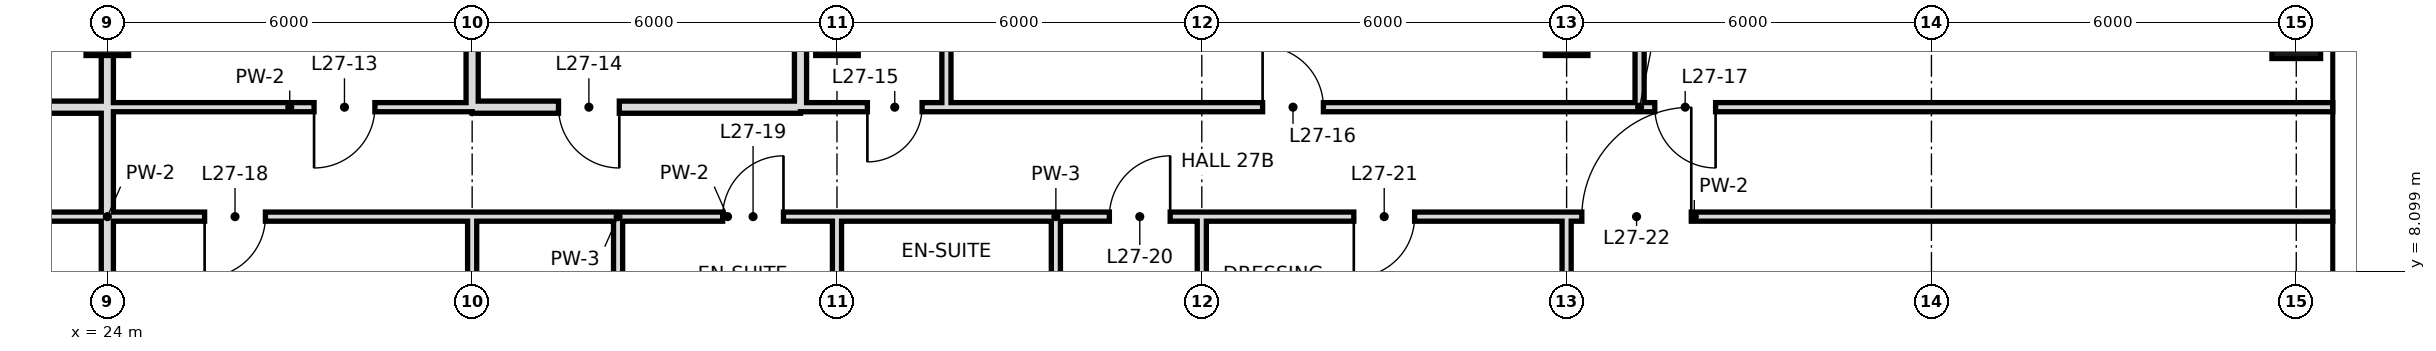
"""IFC4 building model, lengths in metres.
Left out: names, types, materials, properties, quantities, classifications, styles, units other than length and angle.
Written with IfcOpenShell. Run it as: python <this file> out.ifc"""

import sys

from ifc_helpers import new_model, si_unit, direction, frame, frame_2d, origin, origin_2d, place, context, subcontext, project, spatial, rectangle, hollow_rectangle, extrude, element, fill, save


model = new_model("IFC4")
c1 = context("Model", 3, precision=1e-05, world=origin(), true_north=direction((0.0, 1.0)))
c2 = subcontext(c1, "Body", "Model", "MODEL_VIEW")
j1 = project(units=[si_unit("LENGTHUNIT", "METRE"), si_unit("PLANEANGLEUNIT", "RADIAN")], contexts=[c1])
p1 = place(None, origin())
s1 = spatial("IfcSite", under=j1, at=p1, CompositionType="ELEMENT")
p2 = place(p1, origin())
s2 = spatial("IfcBuilding", under=s1, at=p2, CompositionType="ELEMENT")
p3 = place(p2, frame((0.0, 0.0, 123.2)))
s3 = spatial("IfcBuildingStorey", under=s2, at=p3, CompositionType="ELEMENT", Elevation=123.2)
for number, where, z_axis, x_axis in (
    (1, (24.0, 12.0, 0.0), (0.0, 0.0, 1.0), (1.0, 0.0, 0.0)),
    (2, (36.0, 12.0, 0.0), (0.0, 0.0, 1.0), (1.0, 0.0, 0.0)),
    (3, (48.0, 12.0, 0.0), (0.0, 0.0, 1.0), (1.0, 0.0, 0.0)),
):
    element("IfcColumn", number, at=place(p3, frame(where, z_axis=z_axis, x_axis=x_axis)), inside=s3, PredefinedType="COLUMN", context=c2, shape_type="SweptSolid", body=[
        extrude(hollow_rectangle(XDim=0.7, YDim=0.7, WallThickness=0.036, at=origin_2d()), origin(), (0.0, 0.0, 1.0), 3.6),
    ])
p4 = place(p3, frame((60.0, 12.0, 0.0), z_axis=(0.0, 0.0, 1.0), x_axis=(1.0, 0.0, 0.0)))
e4 = element("IfcColumn", 4, at=p4, inside=s3, PredefinedType="COLUMN", context=c2, shape_type="SweptSolid", body=[
    extrude(hollow_rectangle(XDim=0.8, YDim=0.8, WallThickness=0.04, at=origin_2d()), origin(), (0.0, 0.0, 1.0), 3.6),
])
p5 = place(p3, frame((24.0, 10.8, 0.0), z_axis=(0.0, 0.0, 1.0), x_axis=(0.0, 1.0, 0.0)))
e5 = element("IfcWall", 5, at=p5, inside=s3, PredefinedType="SOLIDWALL", context=c2, shape_type="SweptSolid", body=[
    extrude(rectangle(XDim=7.9, YDim=0.2, at=frame_2d((3.95, 0.0))), origin(), (0.0, 0.0, 1.0), 2.72),
])
p6 = place(p3, frame((24.0, 0.0, 0.0), z_axis=(0.0, 0.0, 1.0), x_axis=(0.0, 1.0, 0.0)))
e6 = element("IfcWall", 6, at=p6, inside=s3, PredefinedType="SOLIDWALL", context=c2, shape_type="SweptSolid", body=[
    extrude(rectangle(XDim=10.8, YDim=0.2, at=frame_2d((5.4, 0.0))), origin(), (0.0, 0.0, 1.0), 2.72),
])
p7 = place(p3, frame((30.0, 10.8, 0.0), z_axis=(0.0, 0.0, 1.0), x_axis=(0.0, 1.0, 0.0)))
e7 = element("IfcWall", 7, at=p7, inside=s3, PredefinedType="SOLIDWALL", context=c2, shape_type="SweptSolid", body=[
    extrude(rectangle(XDim=7.9, YDim=0.2, at=frame_2d((3.95, 0.0))), origin(), (0.0, 0.0, 1.0), 2.72),
])
p8 = place(p3, frame((30.0, 6.0, 0.0), z_axis=(0.0, 0.0, 1.0), x_axis=(0.0, 1.0, 0.0)))
e8 = element("IfcWall", 8, at=p8, inside=s3, PredefinedType="PARTITIONING", context=c2, shape_type="SweptSolid", body=[
    extrude(rectangle(XDim=3.0, YDim=0.15, at=frame_2d((1.5, 0.0))), origin(), (0.0, 0.0, 1.0), 2.72),
])
p9 = place(p3, frame((32.4, 6.0, 0.0), z_axis=(0.0, 0.0, 1.0), x_axis=(0.0, 1.0, 0.0)))
e9 = element("IfcWall", 9, at=p9, inside=s3, PredefinedType="PARTITIONING", context=c2, shape_type="SweptSolid", body=[
    extrude(rectangle(XDim=3.0, YDim=0.15, at=frame_2d((1.5, 0.0))), origin(), (0.0, 0.0, 1.0), 3.42),
])
p10 = place(p3, frame((35.4, 10.8, 0.0), z_axis=(0.0, 0.0, 1.0), x_axis=(0.0, 1.0, 0.0)))
e10 = element("IfcWall", 10, at=p10, inside=s3, PredefinedType="SOLIDWALL", context=c2, shape_type="SweptSolid", body=[
    extrude(rectangle(XDim=7.9, YDim=0.2, at=frame_2d((3.95, 0.0))), origin(), (0.0, 0.0, 1.0), 2.72),
])
p11 = place(p3, frame((36.0, 6.0, 0.0), z_axis=(0.0, 0.0, 1.0), x_axis=(0.0, 1.0, 0.0)))
e11 = element("IfcWall", 11, at=p11, inside=s3, PredefinedType="PARTITIONING", context=c2, shape_type="SweptSolid", body=[
    extrude(rectangle(XDim=3.0, YDim=0.15, at=frame_2d((1.5, 0.0))), origin(), (0.0, 0.0, 1.0), 2.72),
])
p12 = place(p3, frame((37.8, 10.8, 0.0), z_axis=(0.0, 0.0, 1.0), x_axis=(0.0, 1.0, 0.0)))
e12 = element("IfcWall", 12, at=p12, inside=s3, PredefinedType="PARTITIONING", context=c2, shape_type="SweptSolid", body=[
    extrude(rectangle(XDim=7.9, YDim=0.15, at=frame_2d((3.95, 0.0))), origin(), (0.0, 0.0, 1.0), 3.42),
])
p13 = place(p3, frame((39.6, 6.0, 0.0), z_axis=(0.0, 0.0, 1.0), x_axis=(0.0, 1.0, 0.0)))
e13 = element("IfcWall", 13, at=p13, inside=s3, PredefinedType="PARTITIONING", context=c2, shape_type="SweptSolid", body=[
    extrude(rectangle(XDim=3.0, YDim=0.15, at=frame_2d((1.5, 0.0))), origin(), (0.0, 0.0, 1.0), 3.42),
])
p14 = place(p3, frame((42.0, -0.6, 0.0), z_axis=(0.0, 0.0, 1.0), x_axis=(0.0, 1.0, 0.0)))
e14 = element("IfcWall", 14, at=p14, inside=s3, PredefinedType="PARTITIONING", context=c2, shape_type="SweptSolid", body=[
    extrude(rectangle(XDim=9.6, YDim=0.15, at=frame_2d((4.8, 0.0))), origin(), (0.0, 0.0, 1.0), 2.72),
])
p15 = place(p3, frame((48.0, 0.0, 0.0), z_axis=(0.0, 0.0, 1.0), x_axis=(0.0, 1.0, 0.0)))
e15 = element("IfcWall", 15, at=p15, inside=s3, PredefinedType="PARTITIONING", context=c2, shape_type="SweptSolid", body=[
    extrude(rectangle(XDim=9.0, YDim=0.15, at=frame_2d((4.5, 0.0))), origin(), (0.0, 0.0, 1.0), 2.72),
])
p16 = place(p3, frame((49.2, 10.8, 0.0), z_axis=(0.0, 0.0, 1.0), x_axis=(0.0, 1.0, 0.0)))
e16 = element("IfcWall", 16, at=p16, inside=s3, PredefinedType="PARTITIONING", context=c2, shape_type="SweptSolid", body=[
    extrude(rectangle(XDim=20.4, YDim=0.15, at=frame_2d((10.2, 0.0))), origin(), (0.0, 0.0, 1.0), 3.42),
])
p17 = place(p16, frame((17.68, 0.0, 0.0)))
e17 = element("IfcOpeningElement", 17, at=p17, cuts=e16, PredefinedType="OPENING", context=c2, shape_type="SweptSolid", body=[
    extrude(rectangle(XDim=1.0, YDim=2.4, at=frame_2d((0.5, 1.2))), frame((0.0, 0.085, 0.0), z_axis=(0.0, -1.0, 0.0), x_axis=(1.0, 0.0, 0.0)), (0.0, 0.0, 1.0), 0.17),
])
p18 = place(p16, frame((9.88, 0.0, 0.0)))
e18 = element("IfcOpeningElement", 18, at=p18, cuts=e16, PredefinedType="OPENING", context=c2, shape_type="SweptSolid", body=[
    extrude(rectangle(XDim=1.0, YDim=2.4, at=frame_2d((0.5, 1.2))), frame((0.0, 0.085, 0.0), z_axis=(0.0, -1.0, 0.0), x_axis=(1.0, 0.0, 0.0)), (0.0, 0.0, 1.0), 0.17),
])
p19 = place(p3, frame((18.6, 10.8, 0.0), z_axis=(0.0, 0.0, 1.0), x_axis=(1.0, 0.0, 0.0)))
e19 = element("IfcWall", 19, at=p19, inside=s3, PredefinedType="SOLIDWALL", context=c2, shape_type="SweptSolid", body=[
    extrude(rectangle(XDim=5.4, YDim=0.2, at=frame_2d((2.7, 0.0))), origin(), (0.0, 0.0, 1.0), 2.72),
])
p20 = place(p19, frame((2.2, 0.0, 0.0)))
e20 = element("IfcOpeningElement", 20, at=p20, cuts=e19, PredefinedType="OPENING", context=c2, shape_type="SweptSolid", body=[
    extrude(rectangle(XDim=1.0, YDim=2.4, at=frame_2d((0.5, 1.2))), frame((0.0, 0.11, 0.0), z_axis=(0.0, -1.0, 0.0), x_axis=(1.0, 0.0, 0.0)), (0.0, 0.0, 1.0), 0.22),
])
p21 = place(p3, frame((30.0, 10.8, 0.0), z_axis=(0.0, 0.0, 1.0), x_axis=(1.0, 0.0, 0.0)))
e21 = element("IfcWall", 21, at=p21, inside=s3, PredefinedType="SOLIDWALL", context=c2, shape_type="SweptSolid", body=[
    extrude(rectangle(XDim=5.4, YDim=0.2, at=frame_2d((2.7, 0.0))), origin(), (0.0, 0.0, 1.0), 2.72),
])
p22 = place(p21, frame((1.42, 0.0, 0.0)))
e22 = element("IfcOpeningElement", 22, at=p22, cuts=e21, PredefinedType="OPENING", context=c2, shape_type="SweptSolid", body=[
    extrude(rectangle(XDim=1.0, YDim=2.4, at=frame_2d((0.5, 1.2))), frame((0.0, 0.11, 0.0), z_axis=(0.0, -1.0, 0.0), x_axis=(1.0, 0.0, 0.0)), (0.0, 0.0, 1.0), 0.22),
])
p23 = place(p3, frame((24.0, 10.8, 0.0), z_axis=(0.0, 0.0, 1.0), x_axis=(1.0, 0.0, 0.0)))
e23 = element("IfcWall", 23, at=p23, inside=s3, PredefinedType="PARTITIONING", context=c2, shape_type="SweptSolid", body=[
    extrude(rectangle(XDim=6.0, YDim=0.15, at=frame_2d((3.0, 0.0))), origin(), (0.0, 0.0, 1.0), 3.42),
])
p24 = place(p23, frame((3.4, 0.0, 0.0)))
e24 = element("IfcOpeningElement", 24, at=p24, cuts=e23, PredefinedType="OPENING", context=c2, shape_type="SweptSolid", body=[
    extrude(rectangle(XDim=1.0, YDim=2.4, at=frame_2d((0.5, 1.2))), frame((0.0, 0.085, 0.0), z_axis=(0.0, -1.0, 0.0), x_axis=(1.0, 0.0, 0.0)), (0.0, 0.0, 1.0), 0.17),
])
p25 = place(p3, frame((37.8, 10.8, 0.0), z_axis=(0.0, 0.0, 1.0), x_axis=(1.0, 0.0, 0.0)))
e25 = element("IfcWall", 25, at=p25, inside=s3, PredefinedType="PARTITIONING", context=c2, shape_type="SweptSolid", body=[
    extrude(rectangle(XDim=22.8, YDim=0.15, at=frame_2d((11.4, 0.0))), origin(), (0.0, 0.0, 1.0), 3.42),
])
p26 = place(p25, frame((5.2, 0.0, 0.0)))
e26 = element("IfcOpeningElement", 26, at=p26, cuts=e25, PredefinedType="OPENING", context=c2, shape_type="SweptSolid", body=[
    extrude(rectangle(XDim=1.0, YDim=2.4, at=frame_2d((0.5, 1.2))), frame((0.0, 0.085, 0.0), z_axis=(0.0, -1.0, 0.0), x_axis=(1.0, 0.0, 0.0)), (0.0, 0.0, 1.0), 0.17),
])
p27 = place(p25, frame((11.65, 0.0, 0.0)))
e27 = element("IfcOpeningElement", 27, at=p27, cuts=e25, PredefinedType="OPENING", context=c2, shape_type="SweptSolid", body=[
    extrude(rectangle(XDim=1.0, YDim=2.4, at=frame_2d((0.5, 1.2))), frame((0.0, 0.085, 0.0), z_axis=(0.0, -1.0, 0.0), x_axis=(1.0, 0.0, 0.0)), (0.0, 0.0, 1.0), 0.17),
])
p28 = place(p3, frame((35.4, 10.8, 0.0), z_axis=(0.0, 0.0, 1.0), x_axis=(1.0, 0.0, 0.0)))
e28 = element("IfcWall", 28, at=p28, inside=s3, PredefinedType="PARTITIONING", context=c2, shape_type="SweptSolid", body=[
    extrude(rectangle(XDim=2.4, YDim=0.15, at=frame_2d((1.2, 0.0))), origin(), (0.0, 0.0, 1.0), 3.42),
])
p29 = place(p28, frame((1.1, 0.0, 0.0)))
e29 = element("IfcOpeningElement", 29, at=p29, cuts=e28, PredefinedType="OPENING", context=c2, shape_type="SweptSolid", body=[
    extrude(rectangle(XDim=0.9, YDim=2.4, at=frame_2d((0.45, 1.2))), frame((0.0, 0.085, 0.0), z_axis=(0.0, -1.0, 0.0), x_axis=(1.0, 0.0, 0.0)), (0.0, 0.0, 1.0), 0.17),
])
p30 = place(p3, frame((18.0, 9.0, 0.0), z_axis=(0.0, 0.0, 1.0), x_axis=(1.0, 0.0, 0.0)))
e30 = element("IfcWall", 30, at=p30, inside=s3, PredefinedType="PARTITIONING", context=c2, shape_type="SweptSolid", body=[
    extrude(rectangle(XDim=12.0, YDim=0.15, at=frame_2d((6.0, 0.0))), origin(), (0.0, 0.0, 1.0), 3.42),
])
p31 = place(p30, frame((2.1, 0.0, 0.0)))
e31 = element("IfcOpeningElement", 31, at=p31, cuts=e30, PredefinedType="OPENING", context=c2, shape_type="SweptSolid", body=[
    extrude(rectangle(XDim=1.8, YDim=2.4, at=frame_2d((0.9, 1.2))), frame((0.0, 0.085, 0.0), z_axis=(0.0, -1.0, 0.0), x_axis=(1.0, 0.0, 0.0)), (0.0, 0.0, 1.0), 0.17),
])
p32 = place(p30, frame((7.6, 0.0, 0.0)))
e32 = element("IfcOpeningElement", 32, at=p32, cuts=e30, PredefinedType="OPENING", context=c2, shape_type="SweptSolid", body=[
    extrude(rectangle(XDim=1.0, YDim=2.4, at=frame_2d((0.5, 1.2))), frame((0.0, 0.085, 0.0), z_axis=(0.0, -1.0, 0.0), x_axis=(1.0, 0.0, 0.0)), (0.0, 0.0, 1.0), 0.17),
])
p33 = place(p3, frame((32.4, 9.0, 0.0), z_axis=(0.0, 0.0, 1.0), x_axis=(1.0, 0.0, 0.0)))
e33 = element("IfcWall", 33, at=p33, inside=s3, PredefinedType="PARTITIONING", context=c2, shape_type="SweptSolid", body=[
    extrude(rectangle(XDim=3.6, YDim=0.15, at=frame_2d((1.8, 0.0))), origin(), (0.0, 0.0, 1.0), 3.42),
])
p34 = place(p33, frame((1.72, 0.0, 0.0)))
e34 = element("IfcOpeningElement", 34, at=p34, cuts=e33, PredefinedType="OPENING", context=c2, shape_type="SweptSolid", body=[
    extrude(rectangle(XDim=1.0, YDim=2.4, at=frame_2d((0.5, 1.2))), frame((0.0, 0.085, 0.0), z_axis=(0.0, -1.0, 0.0), x_axis=(1.0, 0.0, 0.0)), (0.0, 0.0, 1.0), 0.17),
])
p35 = place(p3, frame((39.6, 9.0, 0.0), z_axis=(0.0, 0.0, 1.0), x_axis=(1.0, 0.0, 0.0)))
e35 = element("IfcWall", 35, at=p35, inside=s3, PredefinedType="PARTITIONING", context=c2, shape_type="SweptSolid", body=[
    extrude(rectangle(XDim=21.0, YDim=0.15, at=frame_2d((10.5, 0.0))), origin(), (0.0, 0.0, 1.0), 3.42),
])
p36 = place(p35, frame((0.88, 0.0, 0.0)))
e36 = element("IfcOpeningElement", 36, at=p36, cuts=e35, PredefinedType="OPENING", context=c2, shape_type="SweptSolid", body=[
    extrude(rectangle(XDim=1.0, YDim=2.4, at=frame_2d((0.5, 1.2))), frame((0.0, 0.085, 0.0), z_axis=(0.0, -1.0, 0.0), x_axis=(1.0, 0.0, 0.0)), (0.0, 0.0, 1.0), 0.17),
])
p37 = place(p35, frame((4.9, 0.0, 0.0)))
e37 = element("IfcOpeningElement", 37, at=p37, cuts=e35, PredefinedType="OPENING", context=c2, shape_type="SweptSolid", body=[
    extrude(rectangle(XDim=1.0, YDim=2.4, at=frame_2d((0.5, 1.2))), frame((0.0, 0.085, 0.0), z_axis=(0.0, -1.0, 0.0), x_axis=(1.0, 0.0, 0.0)), (0.0, 0.0, 1.0), 0.17),
])
p38 = place(p35, frame((8.65, 0.0, 0.0)))
e38 = element("IfcOpeningElement", 38, at=p38, cuts=e35, PredefinedType="OPENING", context=c2, shape_type="SweptSolid", body=[
    extrude(rectangle(XDim=1.8, YDim=2.4, at=frame_2d((0.9, 1.2))), frame((0.0, 0.085, 0.0), z_axis=(0.0, -1.0, 0.0), x_axis=(1.0, 0.0, 0.0)), (0.0, 0.0, 1.0), 0.17),
])
p39 = place(p3, frame((30.0, 9.0, 0.0), z_axis=(0.0, 0.0, 1.0), x_axis=(1.0, 0.0, 0.0)))
e39 = element("IfcWall", 39, at=p39, inside=s3, PredefinedType="PARTITIONING", context=c2, shape_type="SweptSolid", body=[
    extrude(rectangle(XDim=2.4, YDim=0.15, at=frame_2d((1.2, 0.0))), origin(), (0.0, 0.0, 1.0), 3.42),
])
p40 = place(p3, frame((36.0, 9.0, 0.0), z_axis=(0.0, 0.0, 1.0), x_axis=(1.0, 0.0, 0.0)))
e40 = element("IfcWall", 40, at=p40, inside=s3, PredefinedType="PARTITIONING", context=c2, shape_type="SweptSolid", body=[
    extrude(rectangle(XDim=3.6, YDim=0.15, at=frame_2d((1.8, 0.0))), origin(), (0.0, 0.0, 1.0), 3.42),
])
p41 = place(p24, frame((1.0, 0.0, 0.0), z_axis=(0.0, 0.0, 1.0), x_axis=(-1.0, 0.0, 0.0)))
e41 = element("IfcDoor", 41, at=p41, inside=s3, OperationType="SINGLE_SWING_RIGHT", PredefinedType="DOOR", context=c2, shape_type="SweptSolid", body=[
    extrude(rectangle(XDim=1.0, YDim=2.4, at=frame_2d((0.5, 1.2))), frame((0.0, 0.025, 0.0), z_axis=(0.0, -1.0, 0.0), x_axis=(1.0, 0.0, 0.0)), (0.0, 0.0, 1.0), 0.05),
])
fill(e24, e41)
p42 = place(p22, origin())
e42 = element("IfcDoor", 42, at=p42, inside=s3, OperationType="SINGLE_SWING_RIGHT", PredefinedType="DOOR", context=c2, shape_type="SweptSolid", body=[
    extrude(rectangle(XDim=1.0, YDim=2.4, at=frame_2d((0.5, 1.2))), frame((0.0, 0.025, 0.0), z_axis=(0.0, -1.0, 0.0), x_axis=(1.0, 0.0, 0.0)), (0.0, 0.0, 1.0), 0.05),
])
fill(e22, e42)
p43 = place(p29, frame((0.9, 0.0, 0.0), z_axis=(0.0, 0.0, 1.0), x_axis=(-1.0, 0.0, 0.0)))
e43 = element("IfcDoor", 43, at=p43, inside=s3, OperationType="SINGLE_SWING_RIGHT", PredefinedType="DOOR", context=c2, shape_type="SweptSolid", body=[
    extrude(rectangle(XDim=0.9, YDim=2.4, at=frame_2d((0.45, 1.2))), frame((0.0, 0.025, 0.0), z_axis=(0.0, -1.0, 0.0), x_axis=(1.0, 0.0, 0.0)), (0.0, 0.0, 1.0), 0.05),
])
fill(e29, e43)
p44 = place(p26, origin())
e44 = element("IfcDoor", 44, at=p44, inside=s3, OperationType="SINGLE_SWING_LEFT", PredefinedType="DOOR", context=c2, shape_type="SweptSolid", body=[
    extrude(rectangle(XDim=1.0, YDim=2.4, at=frame_2d((0.5, 1.2))), frame((0.0, 0.025, 0.0), z_axis=(0.0, -1.0, 0.0), x_axis=(1.0, 0.0, 0.0)), (0.0, 0.0, 1.0), 0.05),
])
fill(e26, e44)
p45 = place(p27, origin())
e45 = element("IfcDoor", 45, at=p45, inside=s3, OperationType="SINGLE_SWING_RIGHT", PredefinedType="DOOR", context=c2, shape_type="SweptSolid", body=[
    extrude(rectangle(XDim=1.0, YDim=2.4, at=frame_2d((0.5, 1.2))), frame((0.0, 0.025, 0.0), z_axis=(0.0, -1.0, 0.0), x_axis=(1.0, 0.0, 0.0)), (0.0, 0.0, 1.0), 0.05),
])
fill(e27, e45)
p46 = place(p32, frame((1.0, 0.0, 0.0), z_axis=(0.0, 0.0, 1.0), x_axis=(-1.0, 0.0, 0.0)))
e46 = element("IfcDoor", 46, at=p46, inside=s3, OperationType="SINGLE_SWING_RIGHT", PredefinedType="DOOR", context=c2, shape_type="SweptSolid", body=[
    extrude(rectangle(XDim=1.0, YDim=2.4, at=frame_2d((0.5, 1.2))), frame((0.0, 0.025, 0.0), z_axis=(0.0, -1.0, 0.0), x_axis=(1.0, 0.0, 0.0)), (0.0, 0.0, 1.0), 0.05),
])
fill(e32, e46)
p47 = place(p34, frame((1.0, 0.0, 0.0), z_axis=(0.0, 0.0, 1.0), x_axis=(-1.0, 0.0, 0.0)))
e47 = element("IfcDoor", 47, at=p47, inside=s3, OperationType="SINGLE_SWING_LEFT", PredefinedType="DOOR", context=c2, shape_type="SweptSolid", body=[
    extrude(rectangle(XDim=1.0, YDim=2.4, at=frame_2d((0.5, 1.2))), frame((0.0, 0.025, 0.0), z_axis=(0.0, -1.0, 0.0), x_axis=(1.0, 0.0, 0.0)), (0.0, 0.0, 1.0), 0.05),
])
fill(e34, e47)
p48 = place(p36, frame((1.0, 0.0, 0.0), z_axis=(0.0, 0.0, 1.0), x_axis=(-1.0, 0.0, 0.0)))
e48 = element("IfcDoor", 48, at=p48, inside=s3, OperationType="SINGLE_SWING_LEFT", PredefinedType="DOOR", context=c2, shape_type="SweptSolid", body=[
    extrude(rectangle(XDim=1.0, YDim=2.4, at=frame_2d((0.5, 1.2))), frame((0.0, 0.025, 0.0), z_axis=(0.0, -1.0, 0.0), x_axis=(1.0, 0.0, 0.0)), (0.0, 0.0, 1.0), 0.05),
])
fill(e36, e48)
p49 = place(p37, frame((1.0, 0.0, 0.0), z_axis=(0.0, 0.0, 1.0), x_axis=(-1.0, 0.0, 0.0)))
e49 = element("IfcDoor", 49, at=p49, inside=s3, OperationType="SINGLE_SWING_RIGHT", PredefinedType="DOOR", context=c2, shape_type="SweptSolid", body=[
    extrude(rectangle(XDim=1.0, YDim=2.4, at=frame_2d((0.5, 1.2))), frame((0.0, 0.025, 0.0), z_axis=(0.0, -1.0, 0.0), x_axis=(1.0, 0.0, 0.0)), (0.0, 0.0, 1.0), 0.05),
])
fill(e37, e49)
p50 = place(p38, frame((1.8, 0.0, 0.0), z_axis=(0.0, 0.0, 1.0), x_axis=(-1.0, 0.0, 0.0)))
e50 = element("IfcDoor", 50, at=p50, inside=s3, OperationType="SINGLE_SWING_LEFT", PredefinedType="DOOR", context=c2, shape_type="SweptSolid", body=[
    extrude(rectangle(XDim=1.8, YDim=2.4, at=frame_2d((0.9, 1.2))), frame((0.0, 0.025, 0.0), z_axis=(0.0, -1.0, 0.0), x_axis=(1.0, 0.0, 0.0)), (0.0, 0.0, 1.0), 0.05),
])
fill(e38, e50)
save(model, sys.argv[1])
